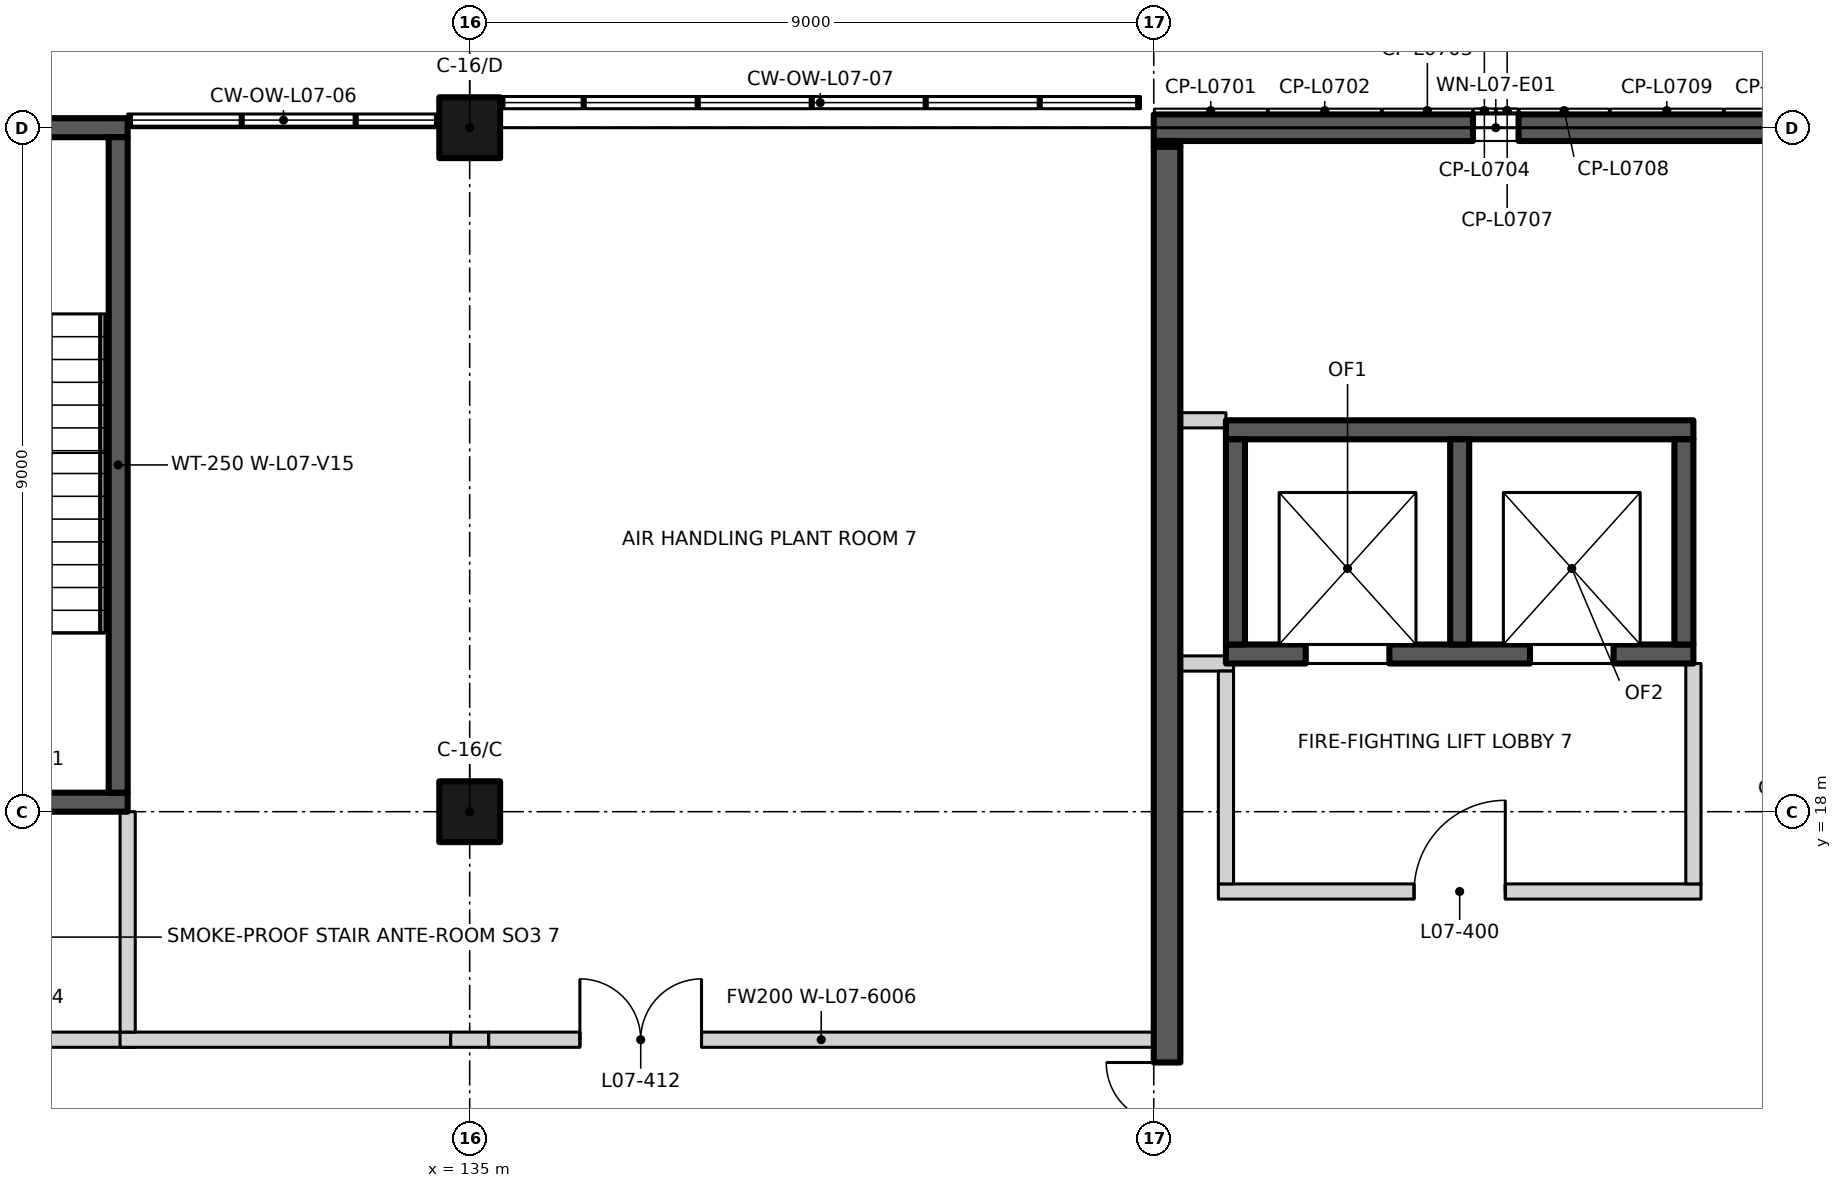
"""IFC4 building model, lengths in metres.
Left out: names, types, materials, properties, quantities, classifications, styles, units other than length and angle.
Written with IfcOpenShell. Run it as: python <this file> out.ifc"""

import sys

from ifc_helpers import new_model, si_unit, direction, frame, frame_2d, origin, origin_2d, place, context, subcontext, project, spatial, rectangle, extrude, element, fill, save


model = new_model("IFC4")
c1 = context("Model", 3, precision=1e-05, world=origin(), true_north=direction((0.0, 1.0)))
c2 = subcontext(c1, "Body", "Model", "MODEL_VIEW")
j1 = project(units=[si_unit("LENGTHUNIT", "METRE"), si_unit("PLANEANGLEUNIT", "RADIAN")], contexts=[c1])
p1 = place(None, origin())
s1 = spatial("IfcSite", under=j1, at=p1, CompositionType="ELEMENT")
p2 = place(p1, origin())
s2 = spatial("IfcBuilding", under=s1, at=p2, CompositionType="ELEMENT")
p3 = place(p2, frame((0.0, 0.0, 33.0)))
s3 = spatial("IfcBuildingStorey", under=s2, at=p3, CompositionType="ELEMENT", Elevation=33.0)
for number, where, z_axis, x_axis in (
    (1, (135.0, 18.0, 0.0), (0.0, 0.0, 1.0), (1.0, 0.0, 0.0)),
    (2, (135.0, 27.0, 0.0), (0.0, 0.0, 1.0), (1.0, 0.0, 0.0)),
):
    element("IfcColumn", number, at=place(p3, frame(where, z_axis=z_axis, x_axis=x_axis)), inside=s3, PredefinedType="COLUMN", context=c2, shape_type="SweptSolid", body=[
        extrude(rectangle(XDim=0.8, YDim=0.8, at=origin_2d()), origin(), (0.0, 0.0, 1.0), 4.5),
    ])
p4 = place(p3, frame((126.4, 18.125, 0.0), z_axis=(0.0, 0.0, 1.0), x_axis=(1.0, 0.0, 0.0)))
e3 = element("IfcWall", 3, at=p4, inside=s3, PredefinedType="SHEAR", context=c2, shape_type="SweptSolid", body=[
    extrude(rectangle(XDim=4.1, YDim=0.25, at=frame_2d((2.05, 0.0))), origin(), (0.0, 0.0, 1.0), 4.5),
])
p5 = place(p4, frame((1.3, 0.0, 0.0)))
e4 = element("IfcOpeningElement", 4, at=p5, cuts=e3, PredefinedType="OPENING", context=c2, shape_type="SweptSolid", body=[
    extrude(rectangle(XDim=1.1, YDim=2.1, at=frame_2d((0.55, 1.05))), frame((0.0, 0.135, 0.0), z_axis=(0.0, -1.0, 0.0), x_axis=(1.0, 0.0, 0.0)), (0.0, 0.0, 1.0), 0.27),
])
p6 = place(p3, frame((128.188, 27.0, 0.0), z_axis=(0.0, 0.0, 1.0), x_axis=(1.0, 0.0, 0.0)))
e5 = element("IfcWall", 5, at=p6, inside=s3, PredefinedType="SHEAR", context=c2, shape_type="SweptSolid", body=[
    extrude(rectangle(XDim=2.312, YDim=0.25, at=frame_2d((1.156, 0.0))), origin(), (0.0, 0.0, 1.0), 4.5),
])
p7 = place(p3, frame((130.375, 18.25, 0.0), z_axis=(0.0, 0.0, 1.0), x_axis=(0.0, 1.0, 0.0)))
e6 = element("IfcWall", 6, at=p7, inside=s3, PredefinedType="SHEAR", context=c2, shape_type="SweptSolid", body=[
    extrude(rectangle(XDim=8.625, YDim=0.25, at=frame_2d((4.312, 0.0))), origin(), (0.0, 0.0, 1.0), 4.5),
])
p8 = place(p3, frame((144.95, 20.075, 0.0), z_axis=(0.0, 0.0, 1.0), x_axis=(1.0, 0.0, 0.0)))
e7 = element("IfcWall", 7, at=p8, inside=s3, PredefinedType="SHEAR", context=c2, shape_type="SweptSolid", body=[
    extrude(rectangle(XDim=6.15, YDim=0.25, at=frame_2d((3.075, 0.0))), origin(), (0.0, 0.0, 1.0), 4.5),
])
p9 = place(p8, frame((1.05, 0.0, 0.0)))
e8 = element("IfcOpeningElement", 8, at=p9, cuts=e7, PredefinedType="OPENING", context=c2, shape_type="SweptSolid", body=[
    extrude(rectangle(XDim=1.1, YDim=2.1, at=frame_2d((0.55, 1.05))), frame((0.0, 0.135, 0.0), z_axis=(0.0, -1.0, 0.0), x_axis=(1.0, 0.0, 0.0)), (0.0, 0.0, 1.0), 0.27),
])
p10 = place(p8, frame((4.0, 0.0, 0.0)))
e9 = element("IfcOpeningElement", 9, at=p10, cuts=e7, PredefinedType="OPENING", context=c2, shape_type="SweptSolid", body=[
    extrude(rectangle(XDim=1.1, YDim=2.1, at=frame_2d((0.55, 1.05))), frame((0.0, 0.135, 0.0), z_axis=(0.0, -1.0, 0.0), x_axis=(1.0, 0.0, 0.0)), (0.0, 0.0, 1.0), 0.27),
])
p11 = place(p3, frame((144.95, 23.025, 0.0), z_axis=(0.0, 0.0, 1.0), x_axis=(1.0, 0.0, 0.0)))
e10 = element("IfcWall", 10, at=p11, inside=s3, PredefinedType="SHEAR", context=c2, shape_type="SweptSolid", body=[
    extrude(rectangle(XDim=6.15, YDim=0.25, at=frame_2d((3.075, 0.0))), origin(), (0.0, 0.0, 1.0), 4.5),
])
for number, where, z_axis, x_axis in (
    (11, (145.075, 20.2, 0.0), (0.0, 0.0, 1.0), (0.0, 1.0, 0.0)),
    (12, (148.025, 20.2, 0.0), (0.0, 0.0, 1.0), (0.0, 1.0, 0.0)),
    (13, (150.975, 20.2, 0.0), (0.0, 0.0, 1.0), (0.0, 1.0, 0.0)),
):
    element("IfcWall", number, at=place(p3, frame(where, z_axis=z_axis, x_axis=x_axis)), inside=s3, PredefinedType="SHEAR", context=c2, shape_type="SweptSolid", body=[
        extrude(rectangle(XDim=2.7, YDim=0.25, at=frame_2d((1.35, 0.0))), origin(), (0.0, 0.0, 1.0), 4.5),
    ])
p12 = place(p3, frame((144.0, 27.0, 0.0), z_axis=(0.0, 0.0, 1.0), x_axis=(1.0, 0.0, 0.0)))
e14 = element("IfcWall", 14, at=p12, inside=s3, PredefinedType="SOLIDWALL", context=c2, shape_type="SweptSolid", body=[
    extrude(rectangle(XDim=18.0, YDim=0.35, at=frame_2d((9.0, 0.0))), origin(), (0.0, 0.0, 1.0), 3.6),
])
p13 = place(p12, frame((4.2, 0.0, 0.6)))
e15 = element("IfcOpeningElement", 15, at=p13, cuts=e14, PredefinedType="OPENING", context=c2, shape_type="SweptSolid", body=[
    extrude(rectangle(XDim=0.6, YDim=2.4, at=frame_2d((0.3, 1.2))), frame((0.0, 0.185, 0.0), z_axis=(0.0, -1.0, 0.0), x_axis=(1.0, 0.0, 0.0)), (0.0, 0.0, 1.0), 0.37),
])
p14 = place(p12, frame((13.2, 0.0, 0.6)))
e16 = element("IfcOpeningElement", 16, at=p14, cuts=e14, PredefinedType="OPENING", context=c2, shape_type="SweptSolid", body=[
    extrude(rectangle(XDim=0.6, YDim=2.4, at=frame_2d((0.3, 1.2))), frame((0.0, 0.185, 0.0), z_axis=(0.0, -1.0, 0.0), x_axis=(1.0, 0.0, 0.0)), (0.0, 0.0, 1.0), 0.37),
])
p15 = place(p3, frame((126.25, 15.0, 0.0), z_axis=(0.0, 0.0, 1.0), x_axis=(1.0, 0.0, 0.0)))
e17 = element("IfcWall", 17, at=p15, inside=s3, PredefinedType="PARTITIONING", context=c2, shape_type="SweptSolid", body=[
    extrude(rectangle(XDim=4.35, YDim=0.2, at=frame_2d((2.175, 0.0))), origin(), (0.0, 0.0, 1.0), 4.2),
])
p16 = place(p15, frame((1.4, 0.0, 0.0)))
e18 = element("IfcOpeningElement", 18, at=p16, cuts=e17, PredefinedType="OPENING", context=c2, shape_type="SweptSolid", body=[
    extrude(rectangle(XDim=1.2, YDim=2.1, at=frame_2d((0.6, 1.05))), frame((0.0, 0.11, 0.0), z_axis=(0.0, -1.0, 0.0), x_axis=(1.0, 0.0, 0.0)), (0.0, 0.0, 1.0), 0.22),
])
p17 = place(p3, frame((130.4, 15.0, 0.0), z_axis=(0.0, 0.0, 1.0), x_axis=(1.0, 0.0, 0.0)))
e19 = element("IfcWall", 19, at=p17, inside=s3, PredefinedType="PARTITIONING", context=c2, shape_type="SweptSolid", body=[
    extrude(rectangle(XDim=4.35, YDim=0.2, at=frame_2d((2.175, 0.0))), origin(), (0.0, 0.0, 1.0), 4.2),
])
p18 = place(p3, frame((134.75, 15.0, 0.0), z_axis=(0.0, 0.0, 1.0), x_axis=(1.0, 0.0, 0.0)))
e20 = element("IfcWall", 20, at=p18, inside=s3, PredefinedType="PARTITIONING", context=c2, shape_type="SweptSolid", body=[
    extrude(rectangle(XDim=0.5, YDim=0.2, at=frame_2d((0.25, 0.0))), origin(), (0.0, 0.0, 1.0), 3.6),
])
p19 = place(p3, frame((135.25, 15.0, 0.0), z_axis=(0.0, 0.0, 1.0), x_axis=(1.0, 0.0, 0.0)))
e21 = element("IfcWall", 21, at=p19, inside=s3, PredefinedType="PARTITIONING", context=c2, shape_type="SweptSolid", body=[
    extrude(rectangle(XDim=8.75, YDim=0.2, at=frame_2d((4.375, 0.0))), origin(), (0.0, 0.0, 1.0), 4.2),
])
p20 = place(p19, frame((1.2, 0.0, 0.0)))
e22 = element("IfcOpeningElement", 22, at=p20, cuts=e21, PredefinedType="OPENING", context=c2, shape_type="SweptSolid", body=[
    extrude(rectangle(XDim=1.6, YDim=2.1, at=frame_2d((0.8, 1.05))), frame((0.0, 0.11, 0.0), z_axis=(0.0, -1.0, 0.0), x_axis=(1.0, 0.0, 0.0)), (0.0, 0.0, 1.0), 0.22),
])
p21 = place(p3, frame((144.85, 16.95, 0.0), z_axis=(0.0, 0.0, 1.0), x_axis=(1.0, 0.0, 0.0)))
e23 = element("IfcWall", 23, at=p21, inside=s3, PredefinedType="PARTITIONING", context=c2, shape_type="SweptSolid", body=[
    extrude(rectangle(XDim=6.35, YDim=0.2, at=frame_2d((3.175, 0.0))), origin(), (0.0, 0.0, 1.0), 4.2),
])
p22 = place(p21, frame((2.575, 0.0, 0.0)))
e24 = element("IfcOpeningElement", 24, at=p22, cuts=e23, PredefinedType="OPENING", context=c2, shape_type="SweptSolid", body=[
    extrude(rectangle(XDim=1.2, YDim=2.1, at=frame_2d((0.6, 1.05))), frame((0.0, 0.11, 0.0), z_axis=(0.0, -1.0, 0.0), x_axis=(1.0, 0.0, 0.0)), (0.0, 0.0, 1.0), 0.22),
])
p23 = place(p3, frame((144.35, 19.95, 0.0), z_axis=(0.0, 0.0, 1.0), x_axis=(1.0, 0.0, 0.0)))
e25 = element("IfcWall", 25, at=p23, inside=s3, PredefinedType="PARTITIONING", context=c2, shape_type="SweptSolid", body=[
    extrude(rectangle(XDim=0.7, YDim=0.2, at=frame_2d((0.35, 0.0))), origin(), (0.0, 0.0, 1.0), 4.2),
])
p24 = place(p3, frame((144.35, 23.15, 0.0), z_axis=(0.0, 0.0, 1.0), x_axis=(1.0, 0.0, 0.0)))
e26 = element("IfcWall", 26, at=p24, inside=s3, PredefinedType="PARTITIONING", context=c2, shape_type="SweptSolid", body=[
    extrude(rectangle(XDim=0.6, YDim=0.2, at=frame_2d((0.3, 0.0))), origin(), (0.0, 0.0, 1.0), 4.2),
])
p25 = place(p3, frame((130.5, 15.1, 0.0), z_axis=(0.0, 0.0, 1.0), x_axis=(0.0, 1.0, 0.0)))
e27 = element("IfcWall", 27, at=p25, inside=s3, PredefinedType="PARTITIONING", context=c2, shape_type="SweptSolid", body=[
    extrude(rectangle(XDim=2.9, YDim=0.2, at=frame_2d((1.45, 0.0))), origin(), (0.0, 0.0, 1.0), 4.2),
])
p26 = place(p3, frame((144.175, 9.35, 0.0), z_axis=(0.0, 0.0, 1.0), x_axis=(0.0, 1.0, 0.0)))
e28 = element("IfcWall", 28, at=p26, inside=s3, PredefinedType="SHEAR", context=c2, shape_type="SweptSolid", body=[
    extrude(rectangle(XDim=17.4, YDim=0.35, at=frame_2d((8.7, 0.0))), origin(), (0.0, 0.0, 1.0), 4.2),
])
p27 = place(p26, frame((3.75, 0.0, 0.0)))
e29 = element("IfcOpeningElement", 29, at=p27, cuts=e28, PredefinedType="OPENING", context=c2, shape_type="SweptSolid", body=[
    extrude(rectangle(XDim=1.6, YDim=2.4, at=frame_2d((0.8, 1.2))), frame((0.0, 0.185, 0.0), z_axis=(0.0, -1.0, 0.0), x_axis=(1.0, 0.0, 0.0)), (0.0, 0.0, 1.0), 0.37),
])
p28 = place(p3, frame((144.175, 26.75, 0.0), z_axis=(0.0, 0.0, 1.0), x_axis=(0.0, 1.0, 0.0)))
e30 = element("IfcWall", 30, at=p28, inside=s3, PredefinedType="SHEAR", context=c2, shape_type="SweptSolid", body=[
    extrude(rectangle(XDim=0.075, YDim=0.35, at=frame_2d((0.038, 0.0))), origin(), (0.0, 0.0, 1.0), 3.6),
])
p29 = place(p3, frame((144.95, 17.05, 0.0), z_axis=(0.0, 0.0, 1.0), x_axis=(0.0, 1.0, 0.0)))
e31 = element("IfcWall", 31, at=p29, inside=s3, PredefinedType="PARTITIONING", context=c2, shape_type="SweptSolid", body=[
    extrude(rectangle(XDim=2.8, YDim=0.2, at=frame_2d((1.4, 0.0))), origin(), (0.0, 0.0, 1.0), 4.2),
])
p30 = place(p3, frame((151.1, 17.05, 0.0), z_axis=(0.0, 0.0, 1.0), x_axis=(0.0, 1.0, 0.0)))
e32 = element("IfcWall", 32, at=p30, inside=s3, PredefinedType="PARTITIONING", context=c2, shape_type="SweptSolid", body=[
    extrude(rectangle(XDim=2.9, YDim=0.2, at=frame_2d((1.45, 0.0))), origin(), (0.0, 0.0, 1.0), 4.2),
])
p31 = place(p9, origin())
e33 = element("IfcDoor", 33, at=p31, inside=s3, OperationType="DOUBLE_DOOR_SLIDING", PredefinedType="DOOR", context=c2, shape_type="SweptSolid", body=[
    extrude(rectangle(XDim=1.1, YDim=2.1, at=frame_2d((0.55, 1.05))), frame((0.0, 0.025, 0.0), z_axis=(0.0, -1.0, 0.0), x_axis=(1.0, 0.0, 0.0)), (0.0, 0.0, 1.0), 0.05),
])
fill(e8, e33)
p32 = place(p10, origin())
e34 = element("IfcDoor", 34, at=p32, inside=s3, OperationType="DOUBLE_DOOR_SLIDING", PredefinedType="DOOR", context=c2, shape_type="SweptSolid", body=[
    extrude(rectangle(XDim=1.1, YDim=2.1, at=frame_2d((0.55, 1.05))), frame((0.0, 0.025, 0.0), z_axis=(0.0, -1.0, 0.0), x_axis=(1.0, 0.0, 0.0)), (0.0, 0.0, 1.0), 0.05),
])
fill(e9, e34)
p33 = place(p13, origin())
e35 = element("IfcWindow", 35, at=p33, inside=s3, PartitioningType="SINGLE_PANEL", PredefinedType="WINDOW", context=c2, shape_type="SweptSolid", body=[
    extrude(rectangle(XDim=0.6, YDim=2.4, at=frame_2d((0.3, 1.2))), frame((0.0, -0.005, 0.0), z_axis=(0.0, -1.0, 0.0), x_axis=(1.0, 0.0, 0.0)), (0.0, 0.0, 1.0), 0.06),
])
fill(e15, e35)
p34 = place(p22, origin())
e36 = element("IfcDoor", 36, at=p34, inside=s3, OperationType="SINGLE_SWING_RIGHT", PredefinedType="DOOR", context=c2, shape_type="SweptSolid", body=[
    extrude(rectangle(XDim=1.2, YDim=2.1, at=frame_2d((0.6, 1.05))), frame((0.0, 0.025, 0.0), z_axis=(0.0, -1.0, 0.0), x_axis=(1.0, 0.0, 0.0)), (0.0, 0.0, 1.0), 0.05),
])
fill(e24, e36)
p35 = place(p27, origin())
e37 = element("IfcDoor", 37, at=p35, inside=s3, OperationType="DOUBLE_DOOR_SINGLE_SWING", PredefinedType="DOOR", context=c2, shape_type="SweptSolid", body=[
    extrude(rectangle(XDim=1.6, YDim=2.4, at=frame_2d((0.8, 1.2))), frame((0.0, 0.025, 0.0), z_axis=(0.0, -1.0, 0.0), x_axis=(1.0, 0.0, 0.0)), (0.0, 0.0, 1.0), 0.05),
])
fill(e29, e37)
p36 = place(p20, origin())
e38 = element("IfcDoor", 38, at=p36, inside=s3, OperationType="DOUBLE_DOOR_SINGLE_SWING", PredefinedType="DOOR", context=c2, shape_type="SweptSolid", body=[
    extrude(rectangle(XDim=1.6, YDim=2.1, at=frame_2d((0.8, 1.05))), frame((0.0, 0.025, 0.0), z_axis=(0.0, -1.0, 0.0), x_axis=(1.0, 0.0, 0.0)), (0.0, 0.0, 1.0), 0.05),
])
fill(e22, e38)
save(model, sys.argv[1])
